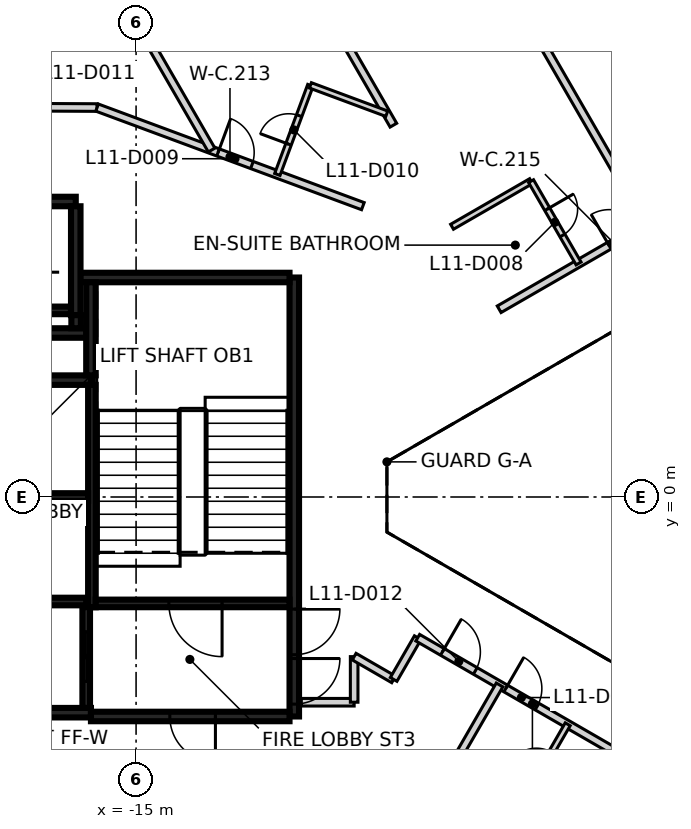
"""IFC4 building model, lengths in metres.
Left out: names, types, materials, properties, quantities, classifications, styles, units other than length and angle.
Written with IfcOpenShell. Run it as: python <this file> out.ifc"""

import sys

from ifc_helpers import new_model, si_unit, direction, frame, frame_2d, origin, place, context, subcontext, project, spatial, rectangle, extrude, element, fill, save


model = new_model("IFC4")
c1 = context("Model", 3, precision=1e-05, world=origin(), true_north=direction((0.0, 1.0)))
c2 = subcontext(c1, "Body", "Model", "MODEL_VIEW")
j1 = project(units=[si_unit("LENGTHUNIT", "METRE"), si_unit("PLANEANGLEUNIT", "RADIAN")], contexts=[c1])
p1 = place(None, origin())
s1 = spatial("IfcSite", under=j1, at=p1, CompositionType="ELEMENT")
p2 = place(p1, origin())
s2 = spatial("IfcBuilding", under=s1, at=p2, CompositionType="ELEMENT")
p3 = place(p2, frame((0.0, 0.0, 53.0)))
s3 = spatial("IfcBuildingStorey", under=s2, at=p3, CompositionType="ELEMENT", Elevation=53.0)
p4 = place(p3, frame((-10.837, 5.775, 0.0), z_axis=(0.0, 0.0, 1.0), x_axis=(0.0, -1.0, 0.0)))
e1 = element("IfcWall", 1, at=p4, inside=s3, PredefinedType="SHEAR", context=c2, shape_type="SweptSolid", body=[
    extrude(rectangle(XDim=11.55, YDim=0.25, at=frame_2d((5.775, 0.0))), origin(), (0.0, 0.0, 1.0), 3.125),
])
p5 = place(p4, frame((10.025, 0.0, 0.0)))
e2 = element("IfcOpeningElement", 2, at=p5, cuts=e1, PredefinedType="OPENING", context=c2, shape_type="SweptSolid", body=[
    extrude(rectangle(XDim=1.2, YDim=2.1, at=frame_2d((0.6, 1.05))), frame((0.0, 0.135, 0.0), z_axis=(0.0, -1.0, 0.0), x_axis=(1.0, 0.0, 0.0)), (0.0, 0.0, 1.0), 0.27),
])
p6 = place(p4, frame((8.725, 0.0, 0.0)))
e3 = element("IfcOpeningElement", 3, at=p6, cuts=e1, PredefinedType="OPENING", context=c2, shape_type="SweptSolid", body=[
    extrude(rectangle(XDim=1.2, YDim=2.1, at=frame_2d((0.6, 1.05))), frame((0.0, 0.135, 0.0), z_axis=(0.0, -1.0, 0.0), x_axis=(1.0, 0.0, 0.0)), (0.0, 0.0, 1.0), 0.27),
])
p7 = place(p3, frame((-16.187, -5.675, 0.0), z_axis=(0.0, 0.0, 1.0), x_axis=(-1.0, 0.0, 0.0)))
e4 = element("IfcWall", 4, at=p7, inside=s3, PredefinedType="SHEAR", context=c2, shape_type="SweptSolid", body=[
    extrude(rectangle(XDim=6.25, YDim=0.25, at=frame_2d((3.125, 0.0))), origin(), (0.0, 0.0, 1.0), 3.125),
])
p8 = place(p3, frame((-10.963, -5.775, 0.0), z_axis=(0.0, 0.0, 1.0), x_axis=(-1.0, 0.0, 0.0)))
e5 = element("IfcWall", 5, at=p8, inside=s3, PredefinedType="SHEAR", context=c2, shape_type="SweptSolid", body=[
    extrude(rectangle(XDim=5.225, YDim=0.25, at=frame_2d((2.612, 0.0))), origin(), (0.0, 0.0, 1.0), 3.125),
])
p9 = place(p8, frame((1.95, 0.0, 0.0)))
e6 = element("IfcOpeningElement", 6, at=p9, cuts=e5, PredefinedType="OPENING", context=c2, shape_type="SweptSolid", body=[
    extrude(rectangle(XDim=1.2, YDim=2.1, at=frame_2d((0.6, 1.05))), frame((0.0, 0.135, 0.0), z_axis=(0.0, -1.0, 0.0), x_axis=(1.0, 0.0, 0.0)), (0.0, 0.0, 1.0), 0.27),
])
p10 = place(p3, frame((-16.472, 5.775, 0.0), z_axis=(0.0, 0.0, 1.0), x_axis=(1.0, 0.0, 0.0)))
e7 = element("IfcWall", 7, at=p10, inside=s3, PredefinedType="SHEAR", context=c2, shape_type="SweptSolid", body=[
    extrude(rectangle(XDim=5.51, YDim=0.25, at=frame_2d((2.755, 0.0))), origin(), (0.0, 0.0, 1.0), 3.125),
])
p11 = place(p3, frame((-19.387, 3.075, 0.0), z_axis=(0.0, 0.0, 1.0), x_axis=(1.0, 0.0, 0.0)))
e8 = element("IfcWall", 8, at=p11, inside=s3, PredefinedType="SHEAR", context=c2, shape_type="SweptSolid", body=[
    extrude(rectangle(XDim=3.2, YDim=0.25, at=frame_2d((1.6, 0.0))), origin(), (0.0, 0.0, 1.0), 3.125),
])
p12 = place(p3, frame((-19.637, 7.775, 0.0), z_axis=(0.0, 0.0, 1.0), x_axis=(1.0, 0.0, 0.0)))
e9 = element("IfcWall", 9, at=p12, inside=s3, PredefinedType="SHEAR", context=c2, shape_type="SweptSolid", body=[
    extrude(rectangle(XDim=3.05, YDim=0.25, at=frame_2d((1.525, 0.0))), origin(), (0.0, 0.0, 1.0), 3.125),
])
p13 = place(p3, frame((-16.587, 7.65, 0.0), z_axis=(0.0, 0.0, 1.0), x_axis=(0.0, -1.0, 0.0)))
e10 = element("IfcWall", 10, at=p13, inside=s3, PredefinedType="SHEAR", context=c2, shape_type="SweptSolid", body=[
    extrude(rectangle(XDim=2.865, YDim=0.25, at=frame_2d((1.432, 0.0))), origin(), (0.0, 0.0, 1.0), 3.125),
])
p14 = place(p3, frame((-16.302, 4.315, 0.0), z_axis=(0.0, 0.0, 1.0), x_axis=(-1.0, 0.0, 0.0)))
e11 = element("IfcWall", 11, at=p14, inside=s3, PredefinedType="SHEAR", context=c2, shape_type="SweptSolid", body=[
    extrude(rectangle(XDim=3.085, YDim=0.25, at=frame_2d((1.542, 0.0))), origin(), (0.0, 0.0, 1.0), 3.125),
])
p15 = place(p3, frame((-16.187, 3.2, 0.0), z_axis=(0.0, 0.0, 1.0), x_axis=(0.0, 1.0, 0.0)))
e12 = element("IfcWall", 12, at=p15, inside=s3, PredefinedType="SHEAR", context=c2, shape_type="SweptSolid", body=[
    extrude(rectangle(XDim=2.449, YDim=0.25, at=frame_2d((1.225, 0.0))), origin(), (0.0, 0.0, 1.0), 3.125),
])
p16 = place(p3, frame((-16.577, 4.785, 0.0), z_axis=(0.0, 0.0, 1.0), x_axis=(0.0, -1.0, 0.0)))
e13 = element("IfcWall", 13, at=p16, inside=s3, PredefinedType="SHEAR", context=c2, shape_type="SweptSolid", body=[
    extrude(rectangle(XDim=0.344, YDim=0.25, at=frame_2d((0.172, 0.0))), origin(), (0.0, 0.0, 1.0), 3.125),
])
p17 = place(p3, frame((-16.162, 2.951, 0.0), z_axis=(0.0, 0.0, 1.0), x_axis=(0.0, -1.0, 0.0)))
e14 = element("IfcWall", 14, at=p17, inside=s3, PredefinedType="SHEAR", context=c2, shape_type="SweptSolid", body=[
    extrude(rectangle(XDim=5.851, YDim=0.2, at=frame_2d((2.925, 0.0))), origin(), (0.0, 0.0, 1.0), 3.125),
])
p18 = place(p3, frame((-10.963, -2.8, 0.0), z_axis=(0.0, 0.0, 1.0), x_axis=(-1.0, 0.0, 0.0)))
e15 = element("IfcWall", 15, at=p18, inside=s3, PredefinedType="SHEAR", context=c2, shape_type="SweptSolid", body=[
    extrude(rectangle(XDim=5.098, YDim=0.2, at=frame_2d((2.549, 0.0))), origin(), (0.0, 0.0, 1.0), 3.125),
])
p19 = place(p18, frame((1.774, 0.0, 0.0)))
e16 = element("IfcOpeningElement", 16, at=p19, cuts=e15, PredefinedType="OPENING", context=c2, shape_type="SweptSolid", body=[
    extrude(rectangle(XDim=1.4, YDim=2.1, at=frame_2d((0.7, 1.05))), frame((0.0, 0.11, 0.0), z_axis=(0.0, -1.0, 0.0), x_axis=(1.0, 0.0, 0.0)), (0.0, 0.0, 1.0), 0.22),
])
p20 = place(p3, frame((-16.263, 0.0, 0.0), z_axis=(0.0, 0.0, 1.0), x_axis=(-1.0, 0.0, 0.0)))
e17 = element("IfcWall", 17, at=p20, inside=s3, PredefinedType="SHEAR", context=c2, shape_type="SweptSolid", body=[
    extrude(rectangle(XDim=3.198, YDim=0.2, at=frame_2d((1.599, 0.0))), origin(), (0.0, 0.0, 1.0), 3.125),
])
p21 = place(p3, frame((-19.511, 4.91, 0.0), z_axis=(0.0, 0.0, 1.0), x_axis=(1.0, 0.0, 0.0)))
e18 = element("IfcWall", 18, at=p21, inside=s3, PredefinedType="SHEAR", context=c2, shape_type="SweptSolid", body=[
    extrude(rectangle(XDim=2.798, YDim=0.2, at=frame_2d((1.399, 0.0))), origin(), (0.0, 0.0, 1.0), 3.125),
])
p22 = place(p21, frame((0.949, 0.0, 0.0)))
e19 = element("IfcOpeningElement", 19, at=p22, cuts=e18, PredefinedType="OPENING", context=c2, shape_type="SweptSolid", body=[
    extrude(rectangle(XDim=0.9, YDim=2.1, at=frame_2d((0.45, 1.05))), frame((0.0, 0.11, 0.0), z_axis=(0.0, -1.0, 0.0), x_axis=(1.0, 0.0, 0.0)), (0.0, 0.0, 1.0), 0.22),
])
p23 = place(p3, frame((-19.412, -2.75, 0.0), z_axis=(0.0, 0.0, 1.0), x_axis=(1.0, 0.0, 0.0)))
e20 = element("IfcWall", 20, at=p23, inside=s3, PredefinedType="SHEAR", context=c2, shape_type="SweptSolid", body=[
    extrude(rectangle(XDim=3.1, YDim=0.2, at=frame_2d((1.55, 0.0))), origin(), (0.0, 0.0, 1.0), 3.125),
])
p24 = place(p3, frame((-16.312, -2.898, 0.0), z_axis=(0.0, 0.0, 1.0), x_axis=(0.0, -1.0, 0.0)))
e21 = element("IfcWall", 21, at=p24, inside=s3, PredefinedType="SHEAR", context=c2, shape_type="SweptSolid", body=[
    extrude(rectangle(XDim=2.651, YDim=0.2, at=frame_2d((1.325, 0.0))), origin(), (0.0, 0.0, 1.0), 3.125),
])
p25 = place(p24, frame((0.652, 0.0, 0.0)))
e22 = element("IfcOpeningElement", 22, at=p25, cuts=e21, PredefinedType="OPENING", context=c2, shape_type="SweptSolid", body=[
    extrude(rectangle(XDim=1.3, YDim=2.1, at=frame_2d((0.65, 1.05))), frame((0.0, 0.11, 0.0), z_axis=(0.0, -1.0, 0.0), x_axis=(1.0, 0.0, 0.0)), (0.0, 0.0, 1.0), 0.22),
])
p26 = place(p3, frame((-20.143, 10.266, 0.0), z_axis=(0.0, 0.0, 1.0), x_axis=(0.999989297417, -0.004626559416, 0.0)))
e23 = element("IfcWall", 23, at=p26, inside=s3, PredefinedType="PARTITIONING", context=c2, shape_type="SweptSolid", body=[
    extrude(rectangle(XDim=4.116, YDim=0.2, at=frame_2d((2.058, 0.0))), origin(), (0.0, 0.0, 1.0), 3.125),
])
p27 = place(p26, frame((1.558, 0.0, 0.0)))
e24 = element("IfcOpeningElement", 24, at=p27, cuts=e23, PredefinedType="OPENING", context=c2, shape_type="SweptSolid", body=[
    extrude(rectangle(XDim=1.0, YDim=2.1, at=frame_2d((0.5, 1.05))), frame((0.0, 0.11, 0.0), z_axis=(0.0, -1.0, 0.0), x_axis=(1.0, 0.0, 0.0)), (0.0, 0.0, 1.0), 0.22),
])
p28 = place(p3, frame((-16.026, 10.246, 0.0), z_axis=(0.0, 0.0, 1.0), x_axis=(0.937598236139, -0.347720502112, 0.0)))
e25 = element("IfcWall", 25, at=p28, inside=s3, PredefinedType="PARTITIONING", context=c2, shape_type="SweptSolid", body=[
    extrude(rectangle(XDim=7.458, YDim=0.2, at=frame_2d((3.729, 0.0))), origin(), (0.0, 0.0, 1.0), 3.125),
])
p29 = place(p28, frame((3.396, 0.0, 0.0)))
e26 = element("IfcOpeningElement", 26, at=p29, cuts=e25, PredefinedType="OPENING", context=c2, shape_type="SweptSolid", body=[
    extrude(rectangle(XDim=0.95, YDim=2.1, at=frame_2d((0.475, 1.05))), frame((0.0, 0.11, 0.0), z_axis=(0.0, -1.0, 0.0), x_axis=(1.0, 0.0, 0.0)), (0.0, 0.0, 1.0), 0.22),
])
p30 = place(p3, frame((-10.652, -5.4, 0.0), z_axis=(0.0, 0.0, 1.0), x_axis=(1.0, 0.0, 0.0)))
e27 = element("IfcWall", 27, at=p30, inside=s3, PredefinedType="PARTITIONING", context=c2, shape_type="SweptSolid", body=[
    extrude(rectangle(XDim=1.39, YDim=0.2, at=frame_2d((0.695, 0.0))), origin(), (0.0, 0.0, 1.0), 3.125),
])
for number, where, z_axis, x_axis in (
    (28, (-9.262, -5.4, 0.0), (0.0, 0.0, 1.0), (0.0, 1.0, 0.0)),
    (29, (-9.262, -4.2, 0.0), (0.0, 0.0, 1.0), (0.866, -0.5, 0.0)),
):
    element("IfcWall", number, at=place(p3, frame(where, z_axis=z_axis, x_axis=x_axis)), inside=s3, PredefinedType="PARTITIONING", context=c2, shape_type="SweptSolid", body=[
        extrude(rectangle(XDim=1.2, YDim=0.2, at=frame_2d((0.6, 0.0))), origin(), (0.0, 0.0, 1.0), 3.125),
    ])
p31 = place(p3, frame((-8.223, -4.8, 0.0), z_axis=(0.0, 0.0, 1.0), x_axis=(0.499866914522, 0.866102227088, 0.0)))
e30 = element("IfcWall", 30, at=p31, inside=s3, PredefinedType="PARTITIONING", context=c2, shape_type="SweptSolid", body=[
    extrude(rectangle(XDim=1.268, YDim=0.2, at=frame_2d((0.634, 0.0))), origin(), (0.0, 0.0, 1.0), 3.125),
])
p32 = place(p3, frame((-7.589, -3.702, 0.0), z_axis=(0.0, 0.0, 1.0), x_axis=(0.865994210678, -0.500054024153, 0.0)))
e31 = element("IfcWall", 31, at=p32, inside=s3, PredefinedType="PARTITIONING", context=c2, shape_type="SweptSolid", body=[
    extrude(rectangle(XDim=6.969, YDim=0.2, at=frame_2d((3.484, 0.0))), origin(), (0.0, 0.0, 1.0), 3.125),
])
p33 = place(p32, frame((0.749, 0.0, 0.0)))
e32 = element("IfcOpeningElement", 32, at=p33, cuts=e31, PredefinedType="OPENING", context=c2, shape_type="SweptSolid", body=[
    extrude(rectangle(XDim=1.0, YDim=2.1, at=frame_2d((0.5, 1.05))), frame((0.0, 0.11, 0.0), z_axis=(0.0, -1.0, 0.0), x_axis=(1.0, 0.0, 0.0)), (0.0, 0.0, 1.0), 0.22),
])
p34 = place(p32, frame((2.674, 0.0, 0.0)))
e33 = element("IfcOpeningElement", 33, at=p34, cuts=e31, PredefinedType="OPENING", context=c2, shape_type="SweptSolid", body=[
    extrude(rectangle(XDim=0.95, YDim=2.1, at=frame_2d((0.475, 1.05))), frame((0.0, 0.11, 0.0), z_axis=(0.0, -1.0, 0.0), x_axis=(1.0, 0.0, 0.0)), (0.0, 0.0, 1.0), 0.22),
])
p35 = place(p3, frame((-5.446, 4.94, 0.0), z_axis=(0.0, 0.0, 1.0), x_axis=(0.866096332545, 0.499877127655, 0.0)))
e34 = element("IfcWall", 34, at=p35, inside=s3, PredefinedType="PARTITIONING", context=c2, shape_type="SweptSolid", body=[
    extrude(rectangle(XDim=6.969, YDim=0.2, at=frame_2d((3.484, 0.0))), origin(), (0.0, 0.0, 1.0), 3.125),
])
p36 = place(p35, frame((5.219, 0.0, 0.0)))
e35 = element("IfcOpeningElement", 35, at=p36, cuts=e34, PredefinedType="OPENING", context=c2, shape_type="SweptSolid", body=[
    extrude(rectangle(XDim=1.0, YDim=2.1, at=frame_2d((0.5, 1.05))), frame((0.0, 0.11, 0.0), z_axis=(0.0, -1.0, 0.0), x_axis=(1.0, 0.0, 0.0)), (0.0, 0.0, 1.0), 0.22),
])
p37 = place(p35, frame((3.344, 0.0, 0.0)))
e36 = element("IfcOpeningElement", 36, at=p37, cuts=e34, PredefinedType="OPENING", context=c2, shape_type="SweptSolid", body=[
    extrude(rectangle(XDim=0.95, YDim=2.1, at=frame_2d((0.475, 1.05))), frame((0.0, 0.11, 0.0), z_axis=(0.0, -1.0, 0.0), x_axis=(1.0, 0.0, 0.0)), (0.0, 0.0, 1.0), 0.22),
])
p38 = place(p3, frame((-17.996, 17.758, 0.0), z_axis=(0.0, 0.0, 1.0), x_axis=(0.500046945013, -0.865998298372, 0.0)))
e37 = element("IfcWall", 37, at=p38, inside=s3, PredefinedType="PARTITIONING", context=c2, shape_type="SweptSolid", body=[
    extrude(rectangle(XDim=9.964, YDim=0.2, at=frame_2d((4.982, 0.0))), origin(), (0.0, 0.0, 1.0), 3.125),
])
p39 = place(p3, frame((-14.149, 20.035, 0.0), z_axis=(0.0, 0.0, 1.0), x_axis=(0.500022967158, -0.866012143284, 0.0)))
e38 = element("IfcWall", 38, at=p39, inside=s3, PredefinedType="PARTITIONING", context=c2, shape_type="SweptSolid", body=[
    extrude(rectangle(XDim=11.838, YDim=0.2, at=frame_2d((5.919, 0.0))), origin(), (0.0, 0.0, 1.0), 3.125),
])
p40 = place(p3, frame((-14.148, -20.035, 0.0), z_axis=(0.0, 0.0, 1.0), x_axis=(0.499978771293, 0.866037659837, 0.0)))
e39 = element("IfcWall", 39, at=p40, inside=s3, PredefinedType="PARTITIONING", context=c2, shape_type="SweptSolid", body=[
    extrude(rectangle(XDim=17.425, YDim=0.2, at=frame_2d((8.712, 0.0))), origin(), (0.0, 0.0, 1.0), 3.125),
])
p41 = place(p3, frame((-10.276, 22.271, 0.0), z_axis=(0.0, 0.0, 1.0), x_axis=(0.499958184216, -0.866049544793, 0.0)))
e40 = element("IfcWall", 40, at=p41, inside=s3, PredefinedType="PARTITIONING", context=c2, shape_type="SweptSolid", body=[
    extrude(rectangle(XDim=17.422, YDim=0.2, at=frame_2d((8.711, 0.0))), origin(), (0.0, 0.0, 1.0), 3.125),
])
p42 = place(p3, frame((-11.283, 8.487, 0.0), z_axis=(0.0, 0.0, 1.0), x_axis=(0.347921729873, 0.937523583641, 0.0)))
e41 = element("IfcWall", 41, at=p42, inside=s3, PredefinedType="PARTITIONING", context=c2, shape_type="SweptSolid", body=[
    extrude(rectangle(XDim=2.5, YDim=0.15, at=frame_2d((1.25, 0.0))), origin(), (0.0, 0.0, 1.0), 3.125),
])
p43 = place(p42, frame((0.85, 0.0, 0.0)))
e42 = element("IfcOpeningElement", 42, at=p43, cuts=e41, PredefinedType="OPENING", context=c2, shape_type="SweptSolid", body=[
    extrude(rectangle(XDim=0.8, YDim=2.1, at=frame_2d((0.4, 1.05))), frame((0.0, 0.085, 0.0), z_axis=(0.0, -1.0, 0.0), x_axis=(1.0, 0.0, 0.0)), (0.0, 0.0, 1.0), 0.17),
])
p44 = place(p3, frame((-10.413, 10.831, 0.0), z_axis=(0.0, 0.0, 1.0), x_axis=(0.937443331153, -0.348137904971, 0.0)))
e43 = element("IfcWall", 43, at=p44, inside=s3, PredefinedType="PARTITIONING", context=c2, shape_type="SweptSolid", body=[
    extrude(rectangle(XDim=2.143, YDim=0.15, at=frame_2d((1.072, 0.0))), origin(), (0.0, 0.0, 1.0), 3.125),
])
p45 = place(p3, frame((-6.686, 7.11, 0.0), z_axis=(0.0, 0.0, 1.0), x_axis=(0.866100915363, 0.499869187296, 0.0)))
e44 = element("IfcWall", 44, at=p45, inside=s3, PredefinedType="PARTITIONING", context=c2, shape_type="SweptSolid", body=[
    extrude(rectangle(XDim=2.401, YDim=0.15, at=frame_2d((1.2, 0.0))), origin(), (0.0, 0.0, 1.0), 3.125),
])
p46 = place(p3, frame((-4.892, -8.145, 0.0), z_axis=(0.0, 0.0, 1.0), x_axis=(0.499711178953, 0.866192090491, 0.0)))
e45 = element("IfcWall", 45, at=p46, inside=s3, PredefinedType="PARTITIONING", context=c2, shape_type="SweptSolid", body=[
    extrude(rectangle(XDim=2.5, YDim=0.15, at=frame_2d((1.25, 0.0))), origin(), (0.0, 0.0, 1.0), 3.125),
])
p47 = place(p46, frame((0.85, 0.0, 0.0)))
e46 = element("IfcOpeningElement", 46, at=p47, cuts=e45, PredefinedType="OPENING", context=c2, shape_type="SweptSolid", body=[
    extrude(rectangle(XDim=0.8, YDim=2.1, at=frame_2d((0.4, 1.05))), frame((0.0, 0.085, 0.0), z_axis=(0.0, -1.0, 0.0), x_axis=(1.0, 0.0, 0.0)), (0.0, 0.0, 1.0), 0.17),
])
p48 = place(p3, frame((-4.607, 8.31, 0.0), z_axis=(0.0, 0.0, 1.0), x_axis=(0.500004234368, -0.866022959057, 0.0)))
e47 = element("IfcWall", 47, at=p48, inside=s3, PredefinedType="PARTITIONING", context=c2, shape_type="SweptSolid", body=[
    extrude(rectangle(XDim=2.5, YDim=0.15, at=frame_2d((1.25, 0.0))), origin(), (0.0, 0.0, 1.0), 3.125),
])
p49 = place(p48, frame((0.85, 0.0, 0.0)))
e48 = element("IfcOpeningElement", 48, at=p49, cuts=e47, PredefinedType="OPENING", context=c2, shape_type="SweptSolid", body=[
    extrude(rectangle(XDim=0.8, YDim=2.1, at=frame_2d((0.4, 1.05))), frame((0.0, 0.085, 0.0), z_axis=(0.0, -1.0, 0.0), x_axis=(1.0, 0.0, 0.0)), (0.0, 0.0, 1.0), 0.17),
])
p50 = place(p25, origin())
e49 = element("IfcDoor", 49, at=p50, inside=s3, OperationType="SLIDING_TO_LEFT", PredefinedType="DOOR", context=c2, shape_type="SweptSolid", body=[
    extrude(rectangle(XDim=1.3, YDim=2.1, at=frame_2d((0.65, 1.05))), frame((0.0, 0.025, 0.0), z_axis=(0.0, -1.0, 0.0), x_axis=(1.0, 0.0, 0.0)), (0.0, 0.0, 1.0), 0.05),
])
fill(e22, e49)
p51 = place(p5, origin())
e50 = element("IfcDoor", 50, at=p51, inside=s3, OperationType="SINGLE_SWING_LEFT", PredefinedType="DOOR", context=c2, shape_type="SweptSolid", body=[
    extrude(rectangle(XDim=1.2, YDim=2.1, at=frame_2d((0.6, 1.05))), frame((0.0, 0.025, 0.0), z_axis=(0.0, -1.0, 0.0), x_axis=(1.0, 0.0, 0.0)), (0.0, 0.0, 1.0), 0.05),
])
fill(e2, e50)
p52 = place(p6, origin())
e51 = element("IfcDoor", 51, at=p52, inside=s3, OperationType="SINGLE_SWING_RIGHT", PredefinedType="DOOR", context=c2, shape_type="SweptSolid", body=[
    extrude(rectangle(XDim=1.2, YDim=2.1, at=frame_2d((0.6, 1.05))), frame((0.0, 0.025, 0.0), z_axis=(0.0, -1.0, 0.0), x_axis=(1.0, 0.0, 0.0)), (0.0, 0.0, 1.0), 0.05),
])
fill(e3, e51)
p53 = place(p19, origin())
e52 = element("IfcDoor", 52, at=p53, inside=s3, OperationType="SINGLE_SWING_LEFT", PredefinedType="DOOR", context=c2, shape_type="SweptSolid", body=[
    extrude(rectangle(XDim=1.4, YDim=2.1, at=frame_2d((0.7, 1.05))), frame((0.0, 0.025, 0.0), z_axis=(0.0, -1.0, 0.0), x_axis=(1.0, 0.0, 0.0)), (0.0, 0.0, 1.0), 0.05),
])
fill(e16, e52)
p54 = place(p9, origin())
e53 = element("IfcDoor", 53, at=p54, inside=s3, OperationType="SINGLE_SWING_RIGHT", PredefinedType="DOOR", context=c2, shape_type="SweptSolid", body=[
    extrude(rectangle(XDim=1.2, YDim=2.1, at=frame_2d((0.6, 1.05))), frame((0.0, 0.025, 0.0), z_axis=(0.0, -1.0, 0.0), x_axis=(1.0, 0.0, 0.0)), (0.0, 0.0, 1.0), 0.05),
])
fill(e6, e53)
p55 = place(p37, origin())
e54 = element("IfcDoor", 54, at=p55, inside=s3, OperationType="SINGLE_SWING_LEFT", PredefinedType="DOOR", context=c2, shape_type="SweptSolid", body=[
    extrude(rectangle(XDim=0.95, YDim=2.1, at=frame_2d((0.475, 1.05))), frame((0.0, 0.025, 0.0), z_axis=(0.0, -1.0, 0.0), x_axis=(1.0, 0.0, 0.0)), (0.0, 0.0, 1.0), 0.05),
])
fill(e36, e54)
p56 = place(p49, frame((0.8, 0.0, 0.0), z_axis=(0.0, 0.0, 1.0), x_axis=(-1.0, 0.0, 0.0)))
e55 = element("IfcDoor", 55, at=p56, inside=s3, OperationType="SINGLE_SWING_LEFT", PredefinedType="DOOR", context=c2, shape_type="SweptSolid", body=[
    extrude(rectangle(XDim=0.8, YDim=2.1, at=frame_2d((0.4, 1.05))), frame((0.0, 0.025, 0.0), z_axis=(0.0, -1.0, 0.0), x_axis=(1.0, 0.0, 0.0)), (0.0, 0.0, 1.0), 0.05),
])
fill(e48, e55)
p57 = place(p29, origin())
e56 = element("IfcDoor", 56, at=p57, inside=s3, OperationType="SINGLE_SWING_LEFT", PredefinedType="DOOR", context=c2, shape_type="SweptSolid", body=[
    extrude(rectangle(XDim=0.95, YDim=2.1, at=frame_2d((0.475, 1.05))), frame((0.0, 0.025, 0.0), z_axis=(0.0, -1.0, 0.0), x_axis=(1.0, 0.0, 0.0)), (0.0, 0.0, 1.0), 0.05),
])
fill(e26, e56)
p58 = place(p43, origin())
e57 = element("IfcDoor", 57, at=p58, inside=s3, OperationType="SINGLE_SWING_LEFT", PredefinedType="DOOR", context=c2, shape_type="SweptSolid", body=[
    extrude(rectangle(XDim=0.8, YDim=2.1, at=frame_2d((0.4, 1.05))), frame((0.0, 0.025, 0.0), z_axis=(0.0, -1.0, 0.0), x_axis=(1.0, 0.0, 0.0)), (0.0, 0.0, 1.0), 0.05),
])
fill(e42, e57)
p59 = place(p33, frame((1.0, 0.0, 0.0), z_axis=(0.0, 0.0, 1.0), x_axis=(-1.0, 0.0, 0.0)))
e58 = element("IfcDoor", 58, at=p59, inside=s3, OperationType="SINGLE_SWING_LEFT", PredefinedType="DOOR", context=c2, shape_type="SweptSolid", body=[
    extrude(rectangle(XDim=1.0, YDim=2.1, at=frame_2d((0.5, 1.05))), frame((0.0, 0.025, 0.0), z_axis=(0.0, -1.0, 0.0), x_axis=(1.0, 0.0, 0.0)), (0.0, 0.0, 1.0), 0.05),
])
fill(e32, e58)
p60 = place(p34, frame((0.95, 0.0, 0.0), z_axis=(0.0, 0.0, 1.0), x_axis=(-1.0, 0.0, 0.0)))
e59 = element("IfcDoor", 59, at=p60, inside=s3, OperationType="SINGLE_SWING_LEFT", PredefinedType="DOOR", context=c2, shape_type="SweptSolid", body=[
    extrude(rectangle(XDim=0.95, YDim=2.1, at=frame_2d((0.475, 1.05))), frame((0.0, 0.025, 0.0), z_axis=(0.0, -1.0, 0.0), x_axis=(1.0, 0.0, 0.0)), (0.0, 0.0, 1.0), 0.05),
])
fill(e33, e59)
save(model, sys.argv[1])
